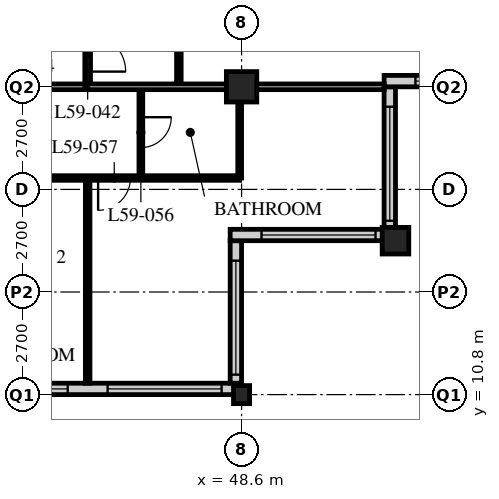
"""IFC4 building model, lengths in metres.
Left out: names, types, materials, properties, quantities, classifications, styles, units other than length and angle.
Written with IfcOpenShell. Run it as: python <this file> out.ifc"""

import sys

from ifc_helpers import new_model, si_unit, direction, frame, frame_2d, origin, origin_2d, place, context, subcontext, project, spatial, rectangle, hollow_rectangle, i_section, extrude, element, fill, save


model = new_model("IFC4")
c1 = context("Model", 3, precision=1e-05, world=origin(), true_north=direction((0.0, 1.0)))
c2 = subcontext(c1, "Body", "Model", "MODEL_VIEW")
j1 = project(units=[si_unit("LENGTHUNIT", "METRE"), si_unit("PLANEANGLEUNIT", "RADIAN")], contexts=[c1])
p1 = place(None, origin())
s1 = spatial("IfcSite", under=j1, at=p1, CompositionType="ELEMENT")
p2 = place(p1, origin())
s2 = spatial("IfcBuilding", under=s1, at=p2, CompositionType="ELEMENT")
p3 = place(p2, frame((0.0, 0.0, 228.0)))
s3 = spatial("IfcBuildingStorey", under=s2, at=p3, CompositionType="ELEMENT", Elevation=228.0)
p4 = place(p3, frame((48.6, 10.8, 0.0), z_axis=(0.0, 0.0, 1.0), x_axis=(1.0, 0.0, 0.0)))
e1 = element("IfcColumn", 1, at=p4, inside=s3, PredefinedType="COLUMN", context=c2, shape_type="SweptSolid", body=[
    extrude(i_section(OverallWidth=0.424, OverallDepth=0.475, WebThickness=0.048, FlangeThickness=0.077, FilletRadius=0.015, at=origin_2d()), origin(), (0.0, 0.0, 1.0), 3.6),
])
p5 = place(p3, frame((48.6, 18.9, 0.0), z_axis=(0.0, 0.0, 1.0), x_axis=(1.0, 0.0, 0.0)))
e2 = element("IfcColumn", 2, at=p5, inside=s3, PredefinedType="COLUMN", context=c2, shape_type="SweptSolid", body=[
    extrude(hollow_rectangle(XDim=0.8, YDim=0.8, WallThickness=0.08, at=origin_2d()), origin(), (0.0, 0.0, 1.0), 3.6),
])
p6 = place(p3, frame((52.65, 14.85, 0.0), z_axis=(0.0, 0.0, 1.0), x_axis=(1.0, 0.0, 0.0)))
e3 = element("IfcColumn", 3, at=p6, inside=s3, PredefinedType="COLUMN", context=c2, shape_type="SweptSolid", body=[
    extrude(hollow_rectangle(XDim=0.7, YDim=0.7, WallThickness=0.07, at=origin_2d()), origin(), (0.0, 0.0, 1.0), 3.6),
])
p7 = place(p3, frame((8.4, 10.95, 0.0), z_axis=(0.0, 0.0, 1.0), x_axis=(1.0, 0.0, 0.0)))
e4 = element("IfcWall", 4, at=p7, inside=s3, PredefinedType="SOLIDWALL", context=c2, shape_type="SweptSolid", body=[
    extrude(rectangle(XDim=40.2, YDim=0.3, at=frame_2d((20.1, 0.0))), origin(), (0.0, 0.0, 1.0), 3.39),
])
p8 = place(p7, frame((0.225, 0.0, 0.6)))
e5 = element("IfcOpeningElement", 5, at=p8, cuts=e4, PredefinedType="OPENING", context=c2, shape_type="SweptSolid", body=[
    extrude(rectangle(XDim=3.0, YDim=2.0, at=frame_2d((1.5, 1.0))), frame((0.0, 0.16, 0.0), z_axis=(0.0, -1.0, 0.0), x_axis=(1.0, 0.0, 0.0)), (0.0, 0.0, 1.0), 0.32),
])
p9 = place(p7, frame((4.275, 0.0, 0.6)))
e6 = element("IfcOpeningElement", 6, at=p9, cuts=e4, PredefinedType="OPENING", context=c2, shape_type="SweptSolid", body=[
    extrude(rectangle(XDim=3.0, YDim=2.0, at=frame_2d((1.5, 1.0))), frame((0.0, 0.16, 0.0), z_axis=(0.0, -1.0, 0.0), x_axis=(1.0, 0.0, 0.0)), (0.0, 0.0, 1.0), 0.32),
])
p10 = place(p7, frame((8.325, 0.0, 0.6)))
e7 = element("IfcOpeningElement", 7, at=p10, cuts=e4, PredefinedType="OPENING", context=c2, shape_type="SweptSolid", body=[
    extrude(rectangle(XDim=3.0, YDim=2.0, at=frame_2d((1.5, 1.0))), frame((0.0, 0.16, 0.0), z_axis=(0.0, -1.0, 0.0), x_axis=(1.0, 0.0, 0.0)), (0.0, 0.0, 1.0), 0.32),
])
p11 = place(p7, frame((12.375, 0.0, 0.6)))
e8 = element("IfcOpeningElement", 8, at=p11, cuts=e4, PredefinedType="OPENING", context=c2, shape_type="SweptSolid", body=[
    extrude(rectangle(XDim=3.0, YDim=2.0, at=frame_2d((1.5, 1.0))), frame((0.0, 0.16, 0.0), z_axis=(0.0, -1.0, 0.0), x_axis=(1.0, 0.0, 0.0)), (0.0, 0.0, 1.0), 0.32),
])
p12 = place(p7, frame((16.425, 0.0, 0.6)))
e9 = element("IfcOpeningElement", 9, at=p12, cuts=e4, PredefinedType="OPENING", context=c2, shape_type="SweptSolid", body=[
    extrude(rectangle(XDim=3.0, YDim=2.0, at=frame_2d((1.5, 1.0))), frame((0.0, 0.16, 0.0), z_axis=(0.0, -1.0, 0.0), x_axis=(1.0, 0.0, 0.0)), (0.0, 0.0, 1.0), 0.32),
])
p13 = place(p7, frame((20.475, 0.0, 0.6)))
e10 = element("IfcOpeningElement", 10, at=p13, cuts=e4, PredefinedType="OPENING", context=c2, shape_type="SweptSolid", body=[
    extrude(rectangle(XDim=3.0, YDim=2.0, at=frame_2d((1.5, 1.0))), frame((0.0, 0.16, 0.0), z_axis=(0.0, -1.0, 0.0), x_axis=(1.0, 0.0, 0.0)), (0.0, 0.0, 1.0), 0.32),
])
p14 = place(p7, frame((24.525, 0.0, 0.6)))
e11 = element("IfcOpeningElement", 11, at=p14, cuts=e4, PredefinedType="OPENING", context=c2, shape_type="SweptSolid", body=[
    extrude(rectangle(XDim=3.0, YDim=2.0, at=frame_2d((1.5, 1.0))), frame((0.0, 0.16, 0.0), z_axis=(0.0, -1.0, 0.0), x_axis=(1.0, 0.0, 0.0)), (0.0, 0.0, 1.0), 0.32),
])
p15 = place(p7, frame((28.575, 0.0, 0.6)))
e12 = element("IfcOpeningElement", 12, at=p15, cuts=e4, PredefinedType="OPENING", context=c2, shape_type="SweptSolid", body=[
    extrude(rectangle(XDim=3.0, YDim=2.0, at=frame_2d((1.5, 1.0))), frame((0.0, 0.16, 0.0), z_axis=(0.0, -1.0, 0.0), x_axis=(1.0, 0.0, 0.0)), (0.0, 0.0, 1.0), 0.32),
])
p16 = place(p7, frame((32.625, 0.0, 0.6)))
e13 = element("IfcOpeningElement", 13, at=p16, cuts=e4, PredefinedType="OPENING", context=c2, shape_type="SweptSolid", body=[
    extrude(rectangle(XDim=3.0, YDim=2.0, at=frame_2d((1.5, 1.0))), frame((0.0, 0.16, 0.0), z_axis=(0.0, -1.0, 0.0), x_axis=(1.0, 0.0, 0.0)), (0.0, 0.0, 1.0), 0.32),
])
p17 = place(p7, frame((36.675, 0.0, 0.6)))
e14 = element("IfcOpeningElement", 14, at=p17, cuts=e4, PredefinedType="OPENING", context=c2, shape_type="SweptSolid", body=[
    extrude(rectangle(XDim=3.0, YDim=2.0, at=frame_2d((1.5, 1.0))), frame((0.0, 0.16, 0.0), z_axis=(0.0, -1.0, 0.0), x_axis=(1.0, 0.0, 0.0)), (0.0, 0.0, 1.0), 0.32),
])
p18 = place(p3, frame((48.45, 11.1, 0.0), z_axis=(0.0, 0.0, 1.0), x_axis=(0.0, 1.0, 0.0)))
e15 = element("IfcWall", 15, at=p18, inside=s3, PredefinedType="SOLIDWALL", context=c2, shape_type="SweptSolid", body=[
    extrude(rectangle(XDim=3.75, YDim=0.3, at=frame_2d((1.875, 0.0))), origin(), (0.0, 0.0, 1.0), 3.39),
])
p19 = place(p18, frame((0.225, 0.0, 0.6)))
e16 = element("IfcOpeningElement", 16, at=p19, cuts=e15, PredefinedType="OPENING", context=c2, shape_type="SweptSolid", body=[
    extrude(rectangle(XDim=3.0, YDim=2.0, at=frame_2d((1.5, 1.0))), frame((0.0, 0.16, 0.0), z_axis=(0.0, -1.0, 0.0), x_axis=(1.0, 0.0, 0.0)), (0.0, 0.0, 1.0), 0.32),
])
p20 = place(p3, frame((48.3, 15.0, 0.0), z_axis=(0.0, 0.0, 1.0), x_axis=(1.0, 0.0, 0.0)))
e17 = element("IfcWall", 17, at=p20, inside=s3, PredefinedType="SOLIDWALL", context=c2, shape_type="SweptSolid", body=[
    extrude(rectangle(XDim=4.35, YDim=0.3, at=frame_2d((2.175, 0.0))), origin(), (0.0, 0.0, 1.0), 3.39),
])
p21 = place(p20, frame((0.825, 0.0, 0.6)))
e18 = element("IfcOpeningElement", 18, at=p21, cuts=e17, PredefinedType="OPENING", context=c2, shape_type="SweptSolid", body=[
    extrude(rectangle(XDim=3.0, YDim=2.0, at=frame_2d((1.5, 1.0))), frame((0.0, 0.16, 0.0), z_axis=(0.0, -1.0, 0.0), x_axis=(1.0, 0.0, 0.0)), (0.0, 0.0, 1.0), 0.32),
])
p22 = place(p3, frame((52.5, 15.15, 0.0), z_axis=(0.0, 0.0, 1.0), x_axis=(0.0, 1.0, 0.0)))
e19 = element("IfcWall", 19, at=p22, inside=s3, PredefinedType="SOLIDWALL", context=c2, shape_type="SweptSolid", body=[
    extrude(rectangle(XDim=3.75, YDim=0.3, at=frame_2d((1.875, 0.0))), origin(), (0.0, 0.0, 1.0), 3.39),
])
p23 = place(p22, frame((0.225, 0.0, 0.6)))
e20 = element("IfcOpeningElement", 20, at=p23, cuts=e19, PredefinedType="OPENING", context=c2, shape_type="SweptSolid", body=[
    extrude(rectangle(XDim=3.0, YDim=2.0, at=frame_2d((1.5, 1.0))), frame((0.0, 0.16, 0.0), z_axis=(0.0, -1.0, 0.0), x_axis=(1.0, 0.0, 0.0)), (0.0, 0.0, 1.0), 0.32),
])
p24 = place(p3, frame((52.35, 19.05, 0.0), z_axis=(0.0, 0.0, 1.0), x_axis=(1.0, 0.0, 0.0)))
e21 = element("IfcWall", 21, at=p24, inside=s3, PredefinedType="SOLIDWALL", context=c2, shape_type="SweptSolid", body=[
    extrude(rectangle(XDim=4.35, YDim=0.3, at=frame_2d((2.175, 0.0))), origin(), (0.0, 0.0, 1.0), 3.39),
])
p25 = place(p24, frame((0.825, 0.0, 0.6)))
e22 = element("IfcOpeningElement", 22, at=p25, cuts=e21, PredefinedType="OPENING", context=c2, shape_type="SweptSolid", body=[
    extrude(rectangle(XDim=3.0, YDim=2.0, at=frame_2d((1.5, 1.0))), frame((0.0, 0.16, 0.0), z_axis=(0.0, -1.0, 0.0), x_axis=(1.0, 0.0, 0.0)), (0.0, 0.0, 1.0), 0.32),
])
p26 = place(p3, frame((8.1, 18.9, 0.0), z_axis=(0.0, 0.0, 1.0), x_axis=(1.0, 0.0, 0.0)))
e23 = element("IfcWall", 23, at=p26, inside=s3, PredefinedType="PARTITIONING", context=c2, shape_type="SweptSolid", body=[
    extrude(rectangle(XDim=36.45, YDim=0.15, at=frame_2d((18.225, 0.0))), origin(), (0.0, 0.0, 1.0), 2.628),
])
p27 = place(p26, frame((4.45, 0.0, 0.0)))
e24 = element("IfcOpeningElement", 24, at=p27, cuts=e23, PredefinedType="OPENING", context=c2, shape_type="SweptSolid", body=[
    extrude(rectangle(XDim=1.0, YDim=2.1, at=frame_2d((0.5, 1.05))), frame((0.0, 0.085, 0.0), z_axis=(0.0, -1.0, 0.0), x_axis=(1.0, 0.0, 0.0)), (0.0, 0.0, 1.0), 0.17),
])
p28 = place(p26, frame((17.1, 0.0, 0.0)))
e25 = element("IfcOpeningElement", 25, at=p28, cuts=e23, PredefinedType="OPENING", context=c2, shape_type="SweptSolid", body=[
    extrude(rectangle(XDim=1.0, YDim=2.1, at=frame_2d((0.5, 1.05))), frame((0.0, 0.085, 0.0), z_axis=(0.0, -1.0, 0.0), x_axis=(1.0, 0.0, 0.0)), (0.0, 0.0, 1.0), 0.17),
])
p29 = place(p26, frame((29.05, 0.0, 0.0)))
e26 = element("IfcOpeningElement", 26, at=p29, cuts=e23, PredefinedType="OPENING", context=c2, shape_type="SweptSolid", body=[
    extrude(rectangle(XDim=1.0, YDim=2.1, at=frame_2d((0.5, 1.05))), frame((0.0, 0.085, 0.0), z_axis=(0.0, -1.0, 0.0), x_axis=(1.0, 0.0, 0.0)), (0.0, 0.0, 1.0), 0.17),
])
p30 = place(p26, frame((2.625, 0.0, 0.0)))
e27 = element("IfcOpeningElement", 27, at=p30, cuts=e23, PredefinedType="OPENING", context=c2, shape_type="SweptSolid", body=[
    extrude(rectangle(XDim=1.0, YDim=2.1, at=frame_2d((0.5, 1.05))), frame((0.0, 0.085, 0.0), z_axis=(0.0, -1.0, 0.0), x_axis=(1.0, 0.0, 0.0)), (0.0, 0.0, 1.0), 0.17),
])
p31 = place(p26, frame((33.925, 0.0, 0.0)))
e28 = element("IfcOpeningElement", 28, at=p31, cuts=e23, PredefinedType="OPENING", context=c2, shape_type="SweptSolid", body=[
    extrude(rectangle(XDim=1.0, YDim=2.1, at=frame_2d((0.5, 1.05))), frame((0.0, 0.085, 0.0), z_axis=(0.0, -1.0, 0.0), x_axis=(1.0, 0.0, 0.0)), (0.0, 0.0, 1.0), 0.17),
])
p32 = place(p3, frame((44.55, 18.9, 0.0), z_axis=(0.0, 0.0, 1.0), x_axis=(0.0, 1.0, 0.0)))
e29 = element("IfcWall", 29, at=p32, inside=s3, PredefinedType="PARTITIONING", context=c2, shape_type="SweptSolid", body=[
    extrude(rectangle(XDim=24.3, YDim=0.15, at=frame_2d((12.15, 0.0))), origin(), (0.0, 0.0, 1.0), 3.39),
])
p33 = place(p32, frame((0.4, 0.0, 0.0)))
e30 = element("IfcOpeningElement", 30, at=p33, cuts=e29, PredefinedType="OPENING", context=c2, shape_type="SweptSolid", body=[
    extrude(rectangle(XDim=1.0, YDim=2.1, at=frame_2d((0.5, 1.05))), frame((0.0, 0.085, 0.0), z_axis=(0.0, -1.0, 0.0), x_axis=(1.0, 0.0, 0.0)), (0.0, 0.0, 1.0), 0.17),
])
p34 = place(p32, frame((16.6, 0.0, 0.0)))
e31 = element("IfcOpeningElement", 31, at=p34, cuts=e29, PredefinedType="OPENING", context=c2, shape_type="SweptSolid", body=[
    extrude(rectangle(XDim=1.0, YDim=2.1, at=frame_2d((0.5, 1.05))), frame((0.0, 0.085, 0.0), z_axis=(0.0, -1.0, 0.0), x_axis=(1.0, 0.0, 0.0)), (0.0, 0.0, 1.0), 0.17),
])
p35 = place(p3, frame((46.95, 18.9, 0.0), z_axis=(0.0, 0.0, 1.0), x_axis=(0.0, 1.0, 0.0)))
e32 = element("IfcWall", 32, at=p35, inside=s3, PredefinedType="PARTITIONING", context=c2, shape_type="SweptSolid", body=[
    extrude(rectangle(XDim=24.3, YDim=0.12, at=frame_2d((12.15, 0.0))), origin(), (0.0, 0.0, 1.0), 3.39),
])
p36 = place(p35, frame((0.975, 0.0, 0.0)))
e33 = element("IfcOpeningElement", 33, at=p36, cuts=e32, PredefinedType="OPENING", context=c2, shape_type="SweptSolid", body=[
    extrude(rectangle(XDim=0.85, YDim=2.1, at=frame_2d((0.425, 1.05))), frame((0.0, 0.07, 0.0), z_axis=(0.0, -1.0, 0.0), x_axis=(1.0, 0.0, 0.0)), (0.0, 0.0, 1.0), 0.14),
])
p37 = place(p35, frame((8.425, 0.0, 0.0)))
e34 = element("IfcOpeningElement", 34, at=p37, cuts=e32, PredefinedType="OPENING", context=c2, shape_type="SweptSolid", body=[
    extrude(rectangle(XDim=0.85, YDim=2.1, at=frame_2d((0.425, 1.05))), frame((0.0, 0.07, 0.0), z_axis=(0.0, -1.0, 0.0), x_axis=(1.0, 0.0, 0.0)), (0.0, 0.0, 1.0), 0.14),
])
p38 = place(p35, frame((12.475, 0.0, 0.0)))
e35 = element("IfcOpeningElement", 35, at=p38, cuts=e32, PredefinedType="OPENING", context=c2, shape_type="SweptSolid", body=[
    extrude(rectangle(XDim=0.85, YDim=2.1, at=frame_2d((0.425, 1.05))), frame((0.0, 0.07, 0.0), z_axis=(0.0, -1.0, 0.0), x_axis=(1.0, 0.0, 0.0)), (0.0, 0.0, 1.0), 0.14),
])
p39 = place(p35, frame((17.175, 0.0, 0.0)))
e36 = element("IfcOpeningElement", 36, at=p39, cuts=e32, PredefinedType="OPENING", context=c2, shape_type="SweptSolid", body=[
    extrude(rectangle(XDim=0.85, YDim=2.1, at=frame_2d((0.425, 1.05))), frame((0.0, 0.07, 0.0), z_axis=(0.0, -1.0, 0.0), x_axis=(1.0, 0.0, 0.0)), (0.0, 0.0, 1.0), 0.14),
])
p40 = place(p35, frame((20.575, 0.0, 0.0)))
e37 = element("IfcOpeningElement", 37, at=p40, cuts=e32, PredefinedType="OPENING", context=c2, shape_type="SweptSolid", body=[
    extrude(rectangle(XDim=0.85, YDim=2.1, at=frame_2d((0.425, 1.05))), frame((0.0, 0.07, 0.0), z_axis=(0.0, -1.0, 0.0), x_axis=(1.0, 0.0, 0.0)), (0.0, 0.0, 1.0), 0.14),
])
p41 = place(p3, frame((40.5, 16.5, 0.0), z_axis=(0.0, 0.0, 1.0), x_axis=(1.0, 0.0, 0.0)))
e38 = element("IfcWall", 38, at=p41, inside=s3, PredefinedType="PARTITIONING", context=c2, shape_type="SweptSolid", body=[
    extrude(rectangle(XDim=8.05, YDim=0.12, at=frame_2d((4.025, 0.0))), origin(), (0.0, 0.0, 1.0), 3.39),
])
p42 = place(p41, frame((0.475, 0.0, 0.0)))
e39 = element("IfcOpeningElement", 39, at=p42, cuts=e38, PredefinedType="OPENING", context=c2, shape_type="SweptSolid", body=[
    extrude(rectangle(XDim=0.85, YDim=2.1, at=frame_2d((0.425, 1.05))), frame((0.0, 0.07, 0.0), z_axis=(0.0, -1.0, 0.0), x_axis=(1.0, 0.0, 0.0)), (0.0, 0.0, 1.0), 0.14),
])
p43 = place(p41, frame((4.325, 0.0, 0.0)))
e40 = element("IfcOpeningElement", 40, at=p43, cuts=e38, PredefinedType="OPENING", context=c2, shape_type="SweptSolid", body=[
    extrude(rectangle(XDim=0.85, YDim=2.1, at=frame_2d((0.425, 1.05))), frame((0.0, 0.07, 0.0), z_axis=(0.0, -1.0, 0.0), x_axis=(1.0, 0.0, 0.0)), (0.0, 0.0, 1.0), 0.14),
])
p44 = place(p3, frame((45.95, 18.9, 0.0), z_axis=(0.0, 0.0, 1.0), x_axis=(0.0, -1.0, 0.0)))
e41 = element("IfcWall", 41, at=p44, inside=s3, PredefinedType="PARTITIONING", context=c2, shape_type="SweptSolid", body=[
    extrude(rectangle(XDim=2.4, YDim=0.1, at=frame_2d((1.2, 0.0))), origin(), (0.0, 0.0, 1.0), 3.39),
])
p45 = place(p44, frame((0.8, 0.0, 0.0)))
e42 = element("IfcOpeningElement", 42, at=p45, cuts=e41, PredefinedType="OPENING", context=c2, shape_type="SweptSolid", body=[
    extrude(rectangle(XDim=0.8, YDim=2.1, at=frame_2d((0.4, 1.05))), frame((0.0, 0.06, 0.0), z_axis=(0.0, -1.0, 0.0), x_axis=(1.0, 0.0, 0.0)), (0.0, 0.0, 1.0), 0.12),
])
p46 = place(p3, frame((48.55, 18.9, 0.0), z_axis=(0.0, 0.0, 1.0), x_axis=(0.0, -1.0, 0.0)))
e43 = element("IfcWall", 43, at=p46, inside=s3, PredefinedType="PARTITIONING", context=c2, shape_type="SweptSolid", body=[
    extrude(rectangle(XDim=2.4, YDim=0.1, at=frame_2d((1.2, 0.0))), origin(), (0.0, 0.0, 1.0), 2.628),
])
p47 = place(p3, frame((44.55, 16.5, 0.0), z_axis=(0.0, 0.0, 1.0), x_axis=(0.0, -1.0, 0.0)))
e44 = element("IfcWall", 44, at=p47, inside=s3, PredefinedType="PARTITIONING", context=c2, shape_type="SweptSolid", body=[
    extrude(rectangle(XDim=5.4, YDim=0.12, at=frame_2d((2.7, 0.0))), origin(), (0.0, 0.0, 1.0), 3.39),
])
p48 = place(p3, frame((44.55, 18.9, 0.0), z_axis=(0.0, 0.0, 1.0), x_axis=(1.0, 0.0, 0.0)))
e45 = element("IfcWall", 45, at=p48, inside=s3, PredefinedType="PARTITIONING", context=c2, shape_type="SweptSolid", body=[
    extrude(rectangle(XDim=7.8, YDim=0.15, at=frame_2d((3.9, 0.0))), origin(), (0.0, 0.0, 1.0), 2.628),
])
p49 = place(p16, origin())
e46 = element("IfcWindow", 46, at=p49, inside=s3, PartitioningType="SINGLE_PANEL", PredefinedType="WINDOW", context=c2, shape_type="SweptSolid", body=[
    extrude(rectangle(XDim=3.0, YDim=2.0, at=frame_2d((1.5, 1.0))), frame((0.0, 0.03, 0.0), z_axis=(0.0, -1.0, 0.0), x_axis=(1.0, 0.0, 0.0)), (0.0, 0.0, 1.0), 0.06),
])
fill(e13, e46)
p50 = place(p17, origin())
e47 = element("IfcWindow", 47, at=p50, inside=s3, PartitioningType="SINGLE_PANEL", PredefinedType="WINDOW", context=c2, shape_type="SweptSolid", body=[
    extrude(rectangle(XDim=3.0, YDim=2.0, at=frame_2d((1.5, 1.0))), frame((0.0, 0.03, 0.0), z_axis=(0.0, -1.0, 0.0), x_axis=(1.0, 0.0, 0.0)), (0.0, 0.0, 1.0), 0.06),
])
fill(e14, e47)
p51 = place(p19, origin())
e48 = element("IfcWindow", 48, at=p51, inside=s3, PartitioningType="SINGLE_PANEL", PredefinedType="WINDOW", context=c2, shape_type="SweptSolid", body=[
    extrude(rectangle(XDim=3.0, YDim=2.0, at=frame_2d((1.5, 1.0))), frame((0.0, 0.03, 0.0), z_axis=(0.0, -1.0, 0.0), x_axis=(1.0, 0.0, 0.0)), (0.0, 0.0, 1.0), 0.06),
])
fill(e16, e48)
p52 = place(p21, origin())
e49 = element("IfcWindow", 49, at=p52, inside=s3, PartitioningType="SINGLE_PANEL", PredefinedType="WINDOW", context=c2, shape_type="SweptSolid", body=[
    extrude(rectangle(XDim=3.0, YDim=2.0, at=frame_2d((1.5, 1.0))), frame((0.0, 0.03, 0.0), z_axis=(0.0, -1.0, 0.0), x_axis=(1.0, 0.0, 0.0)), (0.0, 0.0, 1.0), 0.06),
])
fill(e18, e49)
p53 = place(p23, origin())
e50 = element("IfcWindow", 50, at=p53, inside=s3, PartitioningType="SINGLE_PANEL", PredefinedType="WINDOW", context=c2, shape_type="SweptSolid", body=[
    extrude(rectangle(XDim=3.0, YDim=2.0, at=frame_2d((1.5, 1.0))), frame((0.0, 0.03, 0.0), z_axis=(0.0, -1.0, 0.0), x_axis=(1.0, 0.0, 0.0)), (0.0, 0.0, 1.0), 0.06),
])
fill(e20, e50)
p54 = place(p25, origin())
e51 = element("IfcWindow", 51, at=p54, inside=s3, PartitioningType="SINGLE_PANEL", PredefinedType="WINDOW", context=c2, shape_type="SweptSolid", body=[
    extrude(rectangle(XDim=3.0, YDim=2.0, at=frame_2d((1.5, 1.0))), frame((0.0, 0.03, 0.0), z_axis=(0.0, -1.0, 0.0), x_axis=(1.0, 0.0, 0.0)), (0.0, 0.0, 1.0), 0.06),
])
fill(e22, e51)
p55 = place(p33, origin())
e52 = element("IfcDoor", 52, at=p55, inside=s3, OperationType="SINGLE_SWING_RIGHT", PredefinedType="DOOR", context=c2, shape_type="SweptSolid", body=[
    extrude(rectangle(XDim=1.0, YDim=2.1, at=frame_2d((0.5, 1.05))), frame((0.0, 0.025, 0.0), z_axis=(0.0, -1.0, 0.0), x_axis=(1.0, 0.0, 0.0)), (0.0, 0.0, 1.0), 0.05),
])
fill(e30, e52)
p56 = place(p45, origin())
e53 = element("IfcDoor", 53, at=p56, inside=s3, OperationType="SINGLE_SWING_LEFT", PredefinedType="DOOR", context=c2, shape_type="SweptSolid", body=[
    extrude(rectangle(XDim=0.8, YDim=2.1, at=frame_2d((0.4, 1.05))), frame((0.0, 0.025, 0.0), z_axis=(0.0, -1.0, 0.0), x_axis=(1.0, 0.0, 0.0)), (0.0, 0.0, 1.0), 0.05),
])
fill(e42, e53)
p57 = place(p43, origin())
e54 = element("IfcDoor", 54, at=p57, inside=s3, OperationType="SINGLE_SWING_RIGHT", PredefinedType="DOOR", context=c2, shape_type="SweptSolid", body=[
    extrude(rectangle(XDim=0.85, YDim=2.1, at=frame_2d((0.425, 1.05))), frame((0.0, 0.025, 0.0), z_axis=(0.0, -1.0, 0.0), x_axis=(1.0, 0.0, 0.0)), (0.0, 0.0, 1.0), 0.05),
])
fill(e40, e54)
save(model, sys.argv[1])
